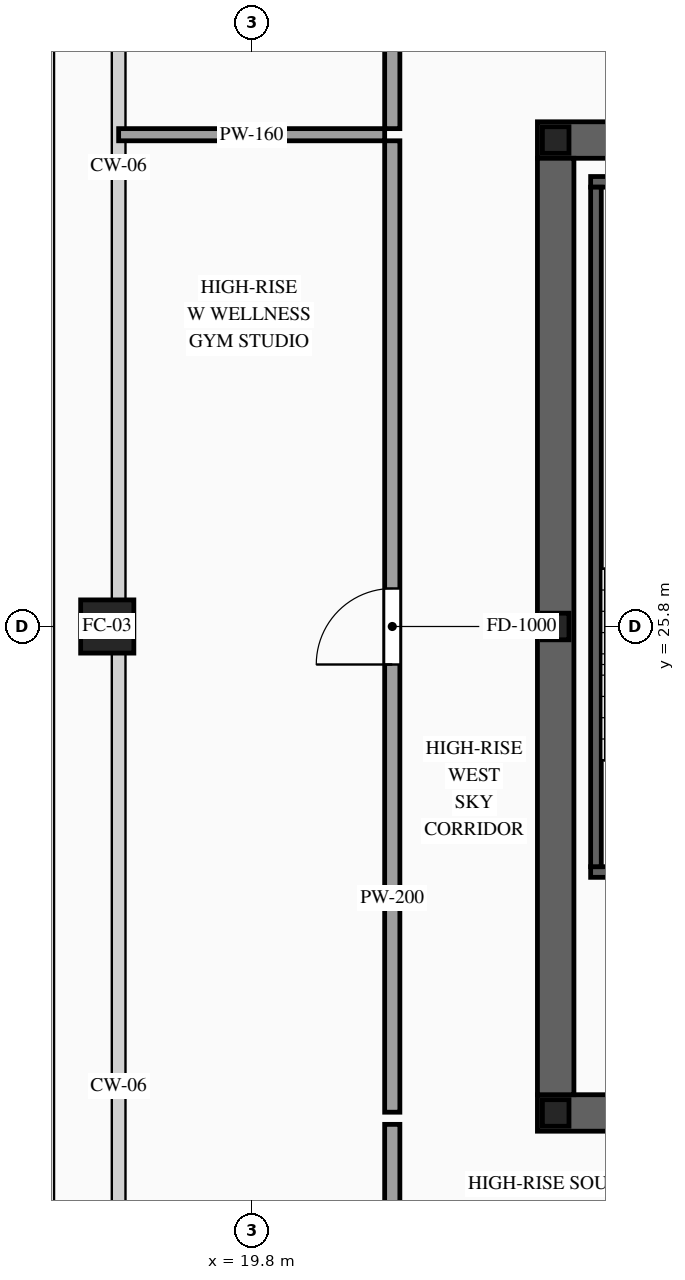
"""IFC4 building model, lengths in metres.
Left out: names, types, materials, properties, quantities, classifications, styles, units other than length and angle.
Written with IfcOpenShell. Run it as: python <this file> out.ifc"""

import sys

from ifc_helpers import new_model, si_unit, direction, frame, frame_2d, origin, origin_2d, place, context, subcontext, project, spatial, rectangle, hollow_rectangle, i_section, extrude, source, transform, mapped, element, fill, save


model = new_model("IFC4")
c1 = context("Model", 3, precision=1e-05, world=origin(), true_north=direction((0.0, 1.0)))
c2 = subcontext(c1, "Body", "Model", "MODEL_VIEW")
j1 = project(units=[si_unit("LENGTHUNIT", "METRE"), si_unit("PLANEANGLEUNIT", "RADIAN")], contexts=[c1])
p1 = place(None, origin())
s1 = spatial("IfcSite", under=j1, at=p1, CompositionType="ELEMENT")
p2 = place(p1, origin())
s2 = spatial("IfcBuilding", under=s1, at=p2, CompositionType="ELEMENT")
p3 = place(p2, frame((0.0, 0.0, 332.2)))
s3 = spatial("IfcBuildingStorey", under=s2, at=p3, CompositionType="ELEMENT", Elevation=332.2)
p4 = place(p3, frame((23.56, 19.4, 0.0), z_axis=(0.0, 0.0, 1.0), x_axis=(1.0, 0.0, 0.0)))
e1 = element("IfcWall", 1, at=p4, inside=s3, PredefinedType="SHEAR", context=c2, shape_type="SweptSolid", body=[
    extrude(rectangle(XDim=26.88, YDim=0.48, at=frame_2d((13.44, 0.0))), origin(), (0.0, 0.0, 1.0), 3.5),
])
p5 = place(p4, frame((1.89, 0.0, 0.0)))
e2 = element("IfcOpeningElement", 2, at=p5, cuts=e1, PredefinedType="OPENING", context=c2, shape_type="SweptSolid", body=[
    extrude(rectangle(XDim=1.1, YDim=2.2, at=frame_2d((0.55, 1.1))), frame((0.0, 0.255, 0.0), z_axis=(0.0, -1.0, 0.0), x_axis=(1.0, 0.0, 0.0)), (0.0, 0.0, 1.0), 0.51),
])
p6 = place(p4, frame((9.79, 0.0, 0.0)))
e3 = element("IfcOpeningElement", 3, at=p6, cuts=e1, PredefinedType="OPENING", context=c2, shape_type="SweptSolid", body=[
    extrude(rectangle(XDim=1.1, YDim=2.2, at=frame_2d((0.55, 1.1))), frame((0.0, 0.255, 0.0), z_axis=(0.0, -1.0, 0.0), x_axis=(1.0, 0.0, 0.0)), (0.0, 0.0, 1.0), 0.51),
])
p7 = place(p4, frame((22.99, 0.0, 0.0)))
e4 = element("IfcOpeningElement", 4, at=p7, cuts=e1, PredefinedType="OPENING", context=c2, shape_type="SweptSolid", body=[
    extrude(rectangle(XDim=1.1, YDim=2.2, at=frame_2d((0.55, 1.1))), frame((0.0, 0.255, 0.0), z_axis=(0.0, -1.0, 0.0), x_axis=(1.0, 0.0, 0.0)), (0.0, 0.0, 1.0), 0.51),
])
p8 = place(p4, frame((19.61, 0.0, 0.0)))
e5 = element("IfcOpeningElement", 5, at=p8, cuts=e1, PredefinedType="OPENING", context=c2, shape_type="SweptSolid", body=[
    extrude(rectangle(XDim=0.9, YDim=2.15, at=frame_2d((0.45, 1.075))), frame((0.0, 0.255, 0.0), z_axis=(0.0, -1.0, 0.0), x_axis=(1.0, 0.0, 0.0)), (0.0, 0.0, 1.0), 0.51),
])
p9 = place(p4, frame((18.17, 0.0, 0.0)))
e6 = element("IfcOpeningElement", 6, at=p9, cuts=e1, PredefinedType="OPENING", context=c2, shape_type="SweptSolid", body=[
    extrude(rectangle(XDim=0.9, YDim=2.15, at=frame_2d((0.45, 1.075))), frame((0.0, 0.255, 0.0), z_axis=(0.0, -1.0, 0.0), x_axis=(1.0, 0.0, 0.0)), (0.0, 0.0, 1.0), 0.51),
])
p10 = place(p3, frame((23.56, 32.2, 0.0), z_axis=(0.0, 0.0, 1.0), x_axis=(1.0, 0.0, 0.0)))
e7 = element("IfcWall", 7, at=p10, inside=s3, PredefinedType="SHEAR", context=c2, shape_type="SweptSolid", body=[
    extrude(rectangle(XDim=26.88, YDim=0.48, at=frame_2d((13.44, 0.0))), origin(), (0.0, 0.0, 1.0), 3.5),
])
p11 = place(p10, frame((4.51, 0.0, 0.0)))
e8 = element("IfcOpeningElement", 8, at=p11, cuts=e7, PredefinedType="OPENING", context=c2, shape_type="SweptSolid", body=[
    extrude(rectangle(XDim=0.9, YDim=2.15, at=frame_2d((0.45, 1.075))), frame((0.0, 0.255, 0.0), z_axis=(0.0, -1.0, 0.0), x_axis=(1.0, 0.0, 0.0)), (0.0, 0.0, 1.0), 0.51),
])
p12 = place(p10, frame((9.79, 0.0, 0.0)))
e9 = element("IfcOpeningElement", 9, at=p12, cuts=e7, PredefinedType="OPENING", context=c2, shape_type="SweptSolid", body=[
    extrude(rectangle(XDim=1.1, YDim=2.2, at=frame_2d((0.55, 1.1))), frame((0.0, 0.255, 0.0), z_axis=(0.0, -1.0, 0.0), x_axis=(1.0, 0.0, 0.0)), (0.0, 0.0, 1.0), 0.51),
])
p13 = place(p10, frame((15.64, 0.0, 0.0)))
e10 = element("IfcOpeningElement", 10, at=p13, cuts=e7, PredefinedType="OPENING", context=c2, shape_type="SweptSolid", body=[
    extrude(rectangle(XDim=1.1, YDim=2.2, at=frame_2d((0.55, 1.1))), frame((0.0, 0.255, 0.0), z_axis=(0.0, -1.0, 0.0), x_axis=(1.0, 0.0, 0.0)), (0.0, 0.0, 1.0), 0.51),
])
p14 = place(p10, frame((18.74, 0.0, 0.0)))
e11 = element("IfcOpeningElement", 11, at=p14, cuts=e7, PredefinedType="OPENING", context=c2, shape_type="SweptSolid", body=[
    extrude(rectangle(XDim=1.1, YDim=2.2, at=frame_2d((0.55, 1.1))), frame((0.0, 0.255, 0.0), z_axis=(0.0, -1.0, 0.0), x_axis=(1.0, 0.0, 0.0)), (0.0, 0.0, 1.0), 0.51),
])
m1 = source(origin(), c2, "Body", "SweptSolid", [
    extrude(rectangle(XDim=12.32, YDim=0.48, at=frame_2d((6.16, 0.0))), origin(), (0.0, 0.0, 1.0), 3.5),
])
p15 = place(p3, frame((23.8, 19.64, 0.0), z_axis=(0.0, 0.0, 1.0), x_axis=(0.0, 1.0, 0.0)))
e12 = element("IfcWall", 12, at=p15, inside=s3, PredefinedType="SHEAR", context=c2, shape_type="MappedRepresentation", body=[
    mapped(m1, transform((0.0, 0.0, 0.0), scale=1.0)),
])
m2 = source(origin(), c2, "Body", "SweptSolid", [
    extrude(i_section(OverallWidth=0.35, OverallDepth=0.35, WebThickness=0.012, FlangeThickness=0.019, at=origin_2d()), origin(), (0.0, 0.0, 1.0), 3.5),
])
for number, where, z_axis, x_axis in (
    (13, (23.8, 19.4, 0.0), (0.0, 0.0, 1.0), (1.0, 0.0, 0.0)),
    (14, (23.8, 25.8, 0.0), (0.0, 0.0, 1.0), (1.0, 0.0, 0.0)),
    (15, (23.8, 32.2, 0.0), (0.0, 0.0, 1.0), (1.0, 0.0, 0.0)),
):
    element("IfcColumn", number, at=place(p3, frame(where, z_axis=z_axis, x_axis=x_axis)), inside=s3, PredefinedType="COLUMN", context=c2, shape_type="MappedRepresentation", body=[
        mapped(m2, transform((0.0, 0.0, 0.0), scale=1.0)),
    ])
m3 = source(origin(), c2, "Body", "SweptSolid", [
    extrude(hollow_rectangle(XDim=0.7, YDim=0.7, WallThickness=0.032, at=origin_2d()), origin(), (0.0, 0.0, 1.0), 3.5),
])
p16 = place(p3, frame((17.9, 25.8, 0.0), z_axis=(0.0, 0.0, 1.0), x_axis=(1.0, 0.0, 0.0)))
e16 = element("IfcColumn", 16, at=p16, inside=s3, PredefinedType="COLUMN", context=c2, shape_type="MappedRepresentation", body=[
    mapped(m3, transform((0.0, 0.0, 0.0), scale=1.0)),
])
p17 = place(p3, frame((24.26, 22.57, 0.0), z_axis=(0.0, 0.0, 1.0), x_axis=(1.0, 0.0, 0.0)))
e17 = element("IfcWall", 17, at=p17, inside=s3, PredefinedType="SOLIDWALL", context=c2, shape_type="SweptSolid", body=[
    extrude(rectangle(XDim=3.28, YDim=0.14, at=frame_2d((1.64, 0.0))), origin(), (0.0, 0.0, 1.0), 3.28),
])
p18 = place(p17, frame((1.09, 0.0, 0.0)))
e18 = element("IfcOpeningElement", 18, at=p18, cuts=e17, PredefinedType="OPENING", context=c2, shape_type="SweptSolid", body=[
    extrude(rectangle(XDim=1.1, YDim=2.2, at=frame_2d((0.55, 1.1))), frame((0.0, 0.085, 0.0), z_axis=(0.0, -1.0, 0.0), x_axis=(1.0, 0.0, 0.0)), (0.0, 0.0, 1.0), 0.17),
])
m4 = source(origin(), c2, "Body", "SweptSolid", [
    extrude(rectangle(XDim=3.28, YDim=0.14, at=frame_2d((1.64, 0.0))), origin(), (0.0, 0.0, 1.0), 3.28),
])
p19 = place(p3, frame((24.26, 31.65, 0.0), z_axis=(0.0, 0.0, 1.0), x_axis=(1.0, 0.0, 0.0)))
e19 = element("IfcWall", 19, at=p19, inside=s3, PredefinedType="SOLIDWALL", context=c2, shape_type="MappedRepresentation", body=[
    mapped(m4, transform((0.0, 0.0, 0.0), scale=1.0)),
])
m5 = source(origin(), c2, "Body", "SweptSolid", [
    extrude(rectangle(XDim=8.94, YDim=0.14, at=frame_2d((4.47, 0.0))), origin(), (0.0, 0.0, 1.0), 3.28),
])
p20 = place(p3, frame((24.33, 22.64, 0.0), z_axis=(0.0, 0.0, 1.0), x_axis=(0.0, 1.0, 0.0)))
e20 = element("IfcWall", 20, at=p20, inside=s3, PredefinedType="SOLIDWALL", context=c2, shape_type="MappedRepresentation", body=[
    mapped(m5, transform((0.0, 0.0, 0.0), scale=1.0)),
])
m6 = source(origin(), c2, "Body", "SweptSolid", [
    extrude(rectangle(XDim=1.7, YDim=0.2, at=frame_2d((0.85, 0.0))), origin(), (0.0, 0.0, 1.0), 3.28),
])
for number, where, z_axis, x_axis in (
    (21, (21.65, 32.35, 0.0), (0.0, 0.0, 1.0), (0.0, 1.0, 0.0)),
    (22, (21.65, 17.55, 0.0), (0.0, 0.0, 1.0), (0.0, 1.0, 0.0)),
):
    element("IfcWall", number, at=place(p3, frame(where, z_axis=z_axis, x_axis=x_axis)), inside=s3, PredefinedType="PARTITIONING", context=c2, shape_type="MappedRepresentation", body=[
        mapped(m6, transform((0.0, 0.0, 0.0), scale=1.0)),
    ])
p21 = place(p3, frame((21.65, 19.41, 0.0), z_axis=(0.0, 0.0, 1.0), x_axis=(0.0, 1.0, 0.0)))
e23 = element("IfcWall", 23, at=p21, inside=s3, PredefinedType="PARTITIONING", context=c2, shape_type="SweptSolid", body=[
    extrude(rectangle(XDim=12.78, YDim=0.2, at=frame_2d((6.39, 0.0))), origin(), (0.0, 0.0, 1.0), 3.28),
])
p22 = place(p21, frame((5.89, 0.0, 0.0)))
e24 = element("IfcOpeningElement", 24, at=p22, cuts=e23, PredefinedType="OPENING", context=c2, shape_type="SweptSolid", body=[
    extrude(rectangle(XDim=1.0, YDim=2.2, at=frame_2d((0.5, 1.1))), frame((0.0, 0.115, 0.0), z_axis=(0.0, -1.0, 0.0), x_axis=(1.0, 0.0, 0.0)), (0.0, 0.0, 1.0), 0.23),
])
m7 = source(origin(), c2, "Body", "SweptSolid", [
    extrude(rectangle(XDim=3.5, YDim=0.16, at=frame_2d((1.75, 0.0))), origin(), (0.0, 0.0, 1.0), 2.825),
])
p23 = place(p3, frame((18.05, 32.27, 0.0), z_axis=(0.0, 0.0, 1.0), x_axis=(1.0, 0.0, 0.0)))
e25 = element("IfcWall", 25, at=p23, inside=s3, PredefinedType="PARTITIONING", context=c2, shape_type="MappedRepresentation", body=[
    mapped(m7, transform((0.0, 0.0, 0.0), scale=1.0)),
])
m8 = source(origin(), c2, "Body", "SweptSolid", [
    extrude(rectangle(XDim=1.0, YDim=2.2, at=frame_2d((0.5, 1.1))), frame((0.0, 0.025, 0.0), z_axis=(0.0, -1.0, 0.0), x_axis=(1.0, 0.0, 0.0)), (0.0, 0.0, 1.0), 0.05),
])
p24 = place(p22, origin())
e26 = element("IfcDoor", 26, at=p24, inside=s3, OperationType="SINGLE_SWING_LEFT", PredefinedType="DOOR", context=c2, shape_type="MappedRepresentation", body=[
    mapped(m8, transform((0.0, 0.0, 0.0), scale=1.0)),
])
fill(e24, e26)
save(model, sys.argv[1])
